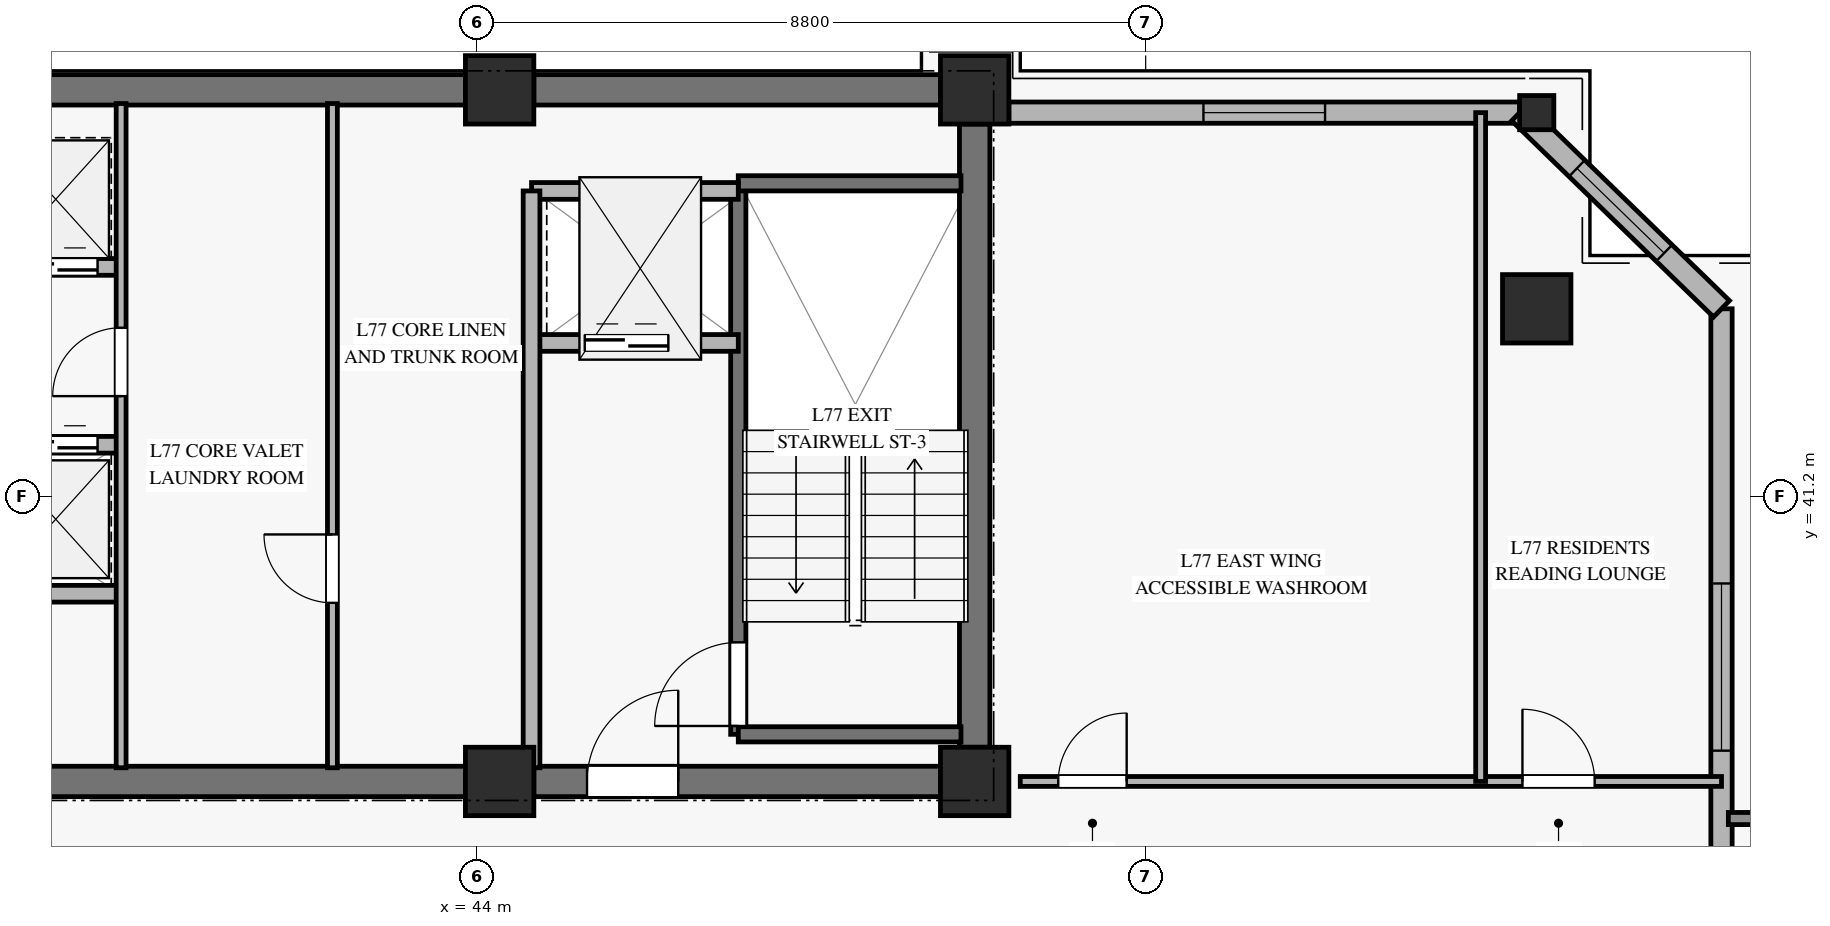
"""IFC4 building model, lengths in metres.
Left out: names, types, materials, properties, quantities, classifications, styles, units other than length and angle.
Written with IfcOpenShell. Run it as: python <this file> out.ifc"""

import sys

from ifc_helpers import new_model, si_unit, direction, frame, frame_2d, origin, origin_2d, place, context, subcontext, project, spatial, rectangle, hollow_rectangle, extrude, source, transform, mapped, element, fill, save


model = new_model("IFC4")
c1 = context("Model", 3, precision=1e-05, world=origin(), true_north=direction((0.0, 1.0)))
c2 = subcontext(c1, "Body", "Model", "MODEL_VIEW")
j1 = project(units=[si_unit("LENGTHUNIT", "METRE"), si_unit("PLANEANGLEUNIT", "RADIAN")], contexts=[c1])
p1 = place(None, origin())
s1 = spatial("IfcSite", under=j1, at=p1, CompositionType="ELEMENT")
p2 = place(p1, origin())
s2 = spatial("IfcBuilding", under=s1, at=p2, CompositionType="ELEMENT")
p3 = place(p2, frame((0.0, 0.0, 300.6)))
s3 = spatial("IfcBuildingStorey", under=s2, at=p3, CompositionType="ELEMENT", Elevation=300.6)
m1 = source(origin(), c2, "Body", "SweptSolid", [
    extrude(rectangle(XDim=0.9, YDim=0.9, at=origin_2d()), origin(), (0.0, 0.0, 1.0), 3.185),
])
for number, where, z_axis, x_axis in (
    (1, (44.3, 37.45, 0.0), (0.0, 0.0, 1.0), (1.0, 0.0, 0.0)),
    (2, (44.3, 46.55, 0.0), (0.0, 0.0, 1.0), (1.0, 0.0, 0.0)),
    (3, (50.55, 37.45, 0.0), (0.0, 0.0, 1.0), (1.0, 0.0, 0.0)),
    (4, (50.55, 46.55, 0.0), (0.0, 0.0, 1.0), (1.0, 0.0, 0.0)),
):
    element("IfcColumn", number, at=place(p3, frame(where, z_axis=z_axis, x_axis=x_axis)), inside=s3, PredefinedType="PILASTER", context=c2, shape_type="MappedRepresentation", body=[
        mapped(m1, transform((0.0, 0.0, 0.0), x_axis=(1.0, 0.0, 0.0), y_axis=(0.0, 1.0, 0.0), z_axis=(0.0, 0.0, 1.0), scale=1.0)),
    ])
p4 = place(p3, frame((36.05, 46.55, 0.0), z_axis=(0.0, 0.0, 1.0), x_axis=(1.0, 0.0, 0.0)))
e5 = element("IfcWall", 5, at=p4, inside=s3, PredefinedType="SHEAR", context=c2, shape_type="SweptSolid", body=[
    extrude(rectangle(XDim=7.8, YDim=0.4, at=frame_2d((3.9, 0.0))), origin(), (0.0, 0.0, 1.0), 3.185),
])
p5 = place(p3, frame((44.75, 46.55, 0.0), z_axis=(0.0, 0.0, 1.0), x_axis=(1.0, 0.0, 0.0)))
e6 = element("IfcWall", 6, at=p5, inside=s3, PredefinedType="SHEAR", context=c2, shape_type="SweptSolid", body=[
    extrude(rectangle(XDim=5.35, YDim=0.4, at=frame_2d((2.675, 0.0))), origin(), (0.0, 0.0, 1.0), 3.185),
])
p6 = place(p3, frame((36.05, 37.45, 0.0), z_axis=(0.0, 0.0, 1.0), x_axis=(1.0, 0.0, 0.0)))
e7 = element("IfcWall", 7, at=p6, inside=s3, PredefinedType="SHEAR", context=c2, shape_type="SweptSolid", body=[
    extrude(rectangle(XDim=7.8, YDim=0.4, at=frame_2d((3.9, 0.0))), origin(), (0.0, 0.0, 1.0), 3.185),
])
p7 = place(p3, frame((44.75, 37.45, 0.0), z_axis=(0.0, 0.0, 1.0), x_axis=(1.0, 0.0, 0.0)))
e8 = element("IfcWall", 8, at=p7, inside=s3, PredefinedType="SHEAR", context=c2, shape_type="SweptSolid", body=[
    extrude(rectangle(XDim=5.35, YDim=0.4, at=frame_2d((2.675, 0.0))), origin(), (0.0, 0.0, 1.0), 3.185),
])
p8 = place(p7, frame((0.7, 0.0, 0.0)))
e9 = element("IfcOpeningElement", 9, at=p8, cuts=e8, PredefinedType="OPENING", context=c2, shape_type="SweptSolid", body=[
    extrude(rectangle(XDim=1.2, YDim=2.15, at=frame_2d((0.6, 1.075))), frame((0.0, 0.21, 0.0), z_axis=(0.0, -1.0, 0.0), x_axis=(1.0, 0.0, 0.0)), (0.0, 0.0, 1.0), 0.42),
])
p9 = place(p3, frame((50.55, 37.9, 0.0), z_axis=(0.0, 0.0, 1.0), x_axis=(0.0, 1.0, 0.0)))
e10 = element("IfcWall", 10, at=p9, inside=s3, PredefinedType="SHEAR", context=c2, shape_type="SweptSolid", body=[
    extrude(rectangle(XDim=8.2, YDim=0.4, at=frame_2d((4.1, 0.0))), origin(), (0.0, 0.0, 1.0), 3.185),
])
m2 = source(origin(), c2, "Body", "SweptSolid", [
    extrude(hollow_rectangle(XDim=0.9, YDim=0.9, WallThickness=0.04, at=origin_2d()), origin(), (0.0, 0.0, 1.0), 3.207),
])
p10 = place(p3, frame((57.945, 43.669, 0.0), z_axis=(-0.115424259294, 0.014389963725, 0.993212046499), x_axis=(-0.123712481455, -0.992318105212, 0.0)))
e11 = element("IfcColumn", 11, at=p10, inside=s3, PredefinedType="COLUMN", context=c2, shape_type="MappedRepresentation", body=[
    mapped(m2, transform((0.0, 0.0, 0.0), x_axis=(1.0, 0.0, 0.0), y_axis=(0.0, 1.0, 0.0), z_axis=(0.0, 0.0, 1.0), scale=1.0)),
])
m3 = source(origin(), c2, "Body", "SweptSolid", [
    extrude(hollow_rectangle(XDim=0.45, YDim=0.45, WallThickness=0.022, at=origin_2d()), origin(), (0.0, 0.0, 1.0), 3.206),
])
p11 = place(p3, frame((57.945, 46.25, 0.0), z_axis=(-0.115436211662, 0.0, 0.993314895205), x_axis=(0.0, -1.0, 0.0)))
e12 = element("IfcColumn", 12, at=p11, inside=s3, PredefinedType="COLUMN", context=c2, shape_type="MappedRepresentation", body=[
    mapped(m3, transform((0.0, 0.0, 0.0), x_axis=(1.0, 0.0, 0.0), y_axis=(0.0, 1.0, 0.0), z_axis=(0.0, 0.0, 1.0), scale=1.0)),
])
p12 = place(p3, frame((60.376, 32.696, 0.0), z_axis=(0.0, 0.0, 1.0), x_axis=(0.0, 1.0, 0.0)))
e13 = element("IfcWall", 13, at=p12, inside=s3, PredefinedType="SOLIDWALL", context=c2, shape_type="SweptSolid", body=[
    extrude(rectangle(XDim=10.973, YDim=0.28, at=frame_2d((5.486, 0.0))), origin(), (0.0, 0.0, 1.0), 2.815),
])
p13 = place(p12, frame((5.159, 0.0, 0.45)))
e14 = element("IfcOpeningElement", 14, at=p13, cuts=e13, PredefinedType="OPENING", context=c2, shape_type="SweptSolid", body=[
    extrude(rectangle(XDim=2.2, YDim=2.1, at=frame_2d((1.1, 1.05))), frame((0.0, 0.15, 0.0), z_axis=(0.0, -1.0, 0.0), x_axis=(1.0, 0.0, 0.0)), (0.0, 0.0, 1.0), 0.3),
])
p14 = place(p3, frame((51.0, 46.25, 0.0), z_axis=(0.0, 0.0, 1.0), x_axis=(1.0, 0.0, 0.0)))
e15 = element("IfcWall", 15, at=p14, inside=s3, PredefinedType="SOLIDWALL", context=c2, shape_type="SweptSolid", body=[
    extrude(rectangle(XDim=6.72, YDim=0.28, at=frame_2d((3.36, 0.0))), origin(), (0.0, 0.0, 1.0), 2.815),
])
p15 = place(p14, frame((2.56, 0.0, 0.45)))
e16 = element("IfcOpeningElement", 16, at=p15, cuts=e15, PredefinedType="OPENING", context=c2, shape_type="SweptSolid", body=[
    extrude(rectangle(XDim=1.6, YDim=2.0, at=frame_2d((0.8, 1.0))), frame((0.0, 0.15, 0.0), z_axis=(0.0, -1.0, 0.0), x_axis=(1.0, 0.0, 0.0)), (0.0, 0.0, 1.0), 0.3),
])
p16 = place(p3, frame((60.376, 43.669, 0.0), z_axis=(0.0, 0.0, 1.0), x_axis=(-0.717153230711, 0.696915521194, 0.0)))
e17 = element("IfcWall", 17, at=p16, inside=s3, PredefinedType="SOLIDWALL", context=c2, shape_type="SweptSolid", body=[
    extrude(rectangle(XDim=3.704, YDim=0.3, at=frame_2d((1.852, 0.0))), origin(), (0.0, 0.0, 1.0), 2.815),
])
p17 = place(p16, frame((1.052, 0.0, 0.45)))
e18 = element("IfcOpeningElement", 18, at=p17, cuts=e17, PredefinedType="OPENING", context=c2, shape_type="SweptSolid", body=[
    extrude(rectangle(XDim=1.6, YDim=2.0, at=frame_2d((0.8, 1.0))), frame((0.0, 0.16, 0.0), z_axis=(0.0, -1.0, 0.0), x_axis=(1.0, 0.0, 0.0)), (0.0, 0.0, 1.0), 0.32),
])
p18 = place(p3, frame((47.44, 38.07, 0.0), z_axis=(0.0, 0.0, 1.0), x_axis=(0.0, 1.0, 0.0)))
e19 = element("IfcWall", 19, at=p18, inside=s3, PredefinedType="SOLIDWALL", context=c2, shape_type="SweptSolid", body=[
    extrude(rectangle(XDim=7.25, YDim=0.2, at=frame_2d((3.625, 0.0))), origin(), (0.0, 0.0, 1.0), 3.4),
])
p19 = place(p18, frame((0.11, 0.0, 0.0)))
e20 = element("IfcOpeningElement", 20, at=p19, cuts=e19, PredefinedType="OPENING", context=c2, shape_type="SweptSolid", body=[
    extrude(rectangle(XDim=1.1, YDim=2.15, at=frame_2d((0.55, 1.075))), frame((0.0, 0.11, 0.0), z_axis=(0.0, -1.0, 0.0), x_axis=(1.0, 0.0, 0.0)), (0.0, 0.0, 1.0), 0.22),
])
for number, where, z_axis, x_axis in (
    (21, (47.44, 45.32, 0.0), (0.0, 0.0, 1.0), (1.0, 0.0, 0.0)),
    (22, (47.44, 38.07, 0.0), (0.0, 0.0, 1.0), (1.0, 0.0, 0.0)),
):
    element("IfcWall", number, at=place(p3, frame(where, z_axis=z_axis, x_axis=x_axis)), inside=s3, PredefinedType="SOLIDWALL", context=c2, shape_type="SweptSolid", body=[
        extrude(rectangle(XDim=2.93, YDim=0.2, at=frame_2d((1.465, 0.0))), origin(), (0.0, 0.0, 1.0), 3.4),
    ])
p20 = place(p3, frame((44.72, 43.22, 0.0), z_axis=(0.0, 0.0, 1.0), x_axis=(1.0, 0.0, 0.0)))
e23 = element("IfcWall", 23, at=p20, inside=s3, PredefinedType="SOLIDWALL", context=c2, shape_type="SweptSolid", body=[
    extrude(rectangle(XDim=2.72, YDim=0.22, at=frame_2d((1.36, 0.0))), origin(), (0.0, 0.0, 1.0), 3.185),
])
p21 = place(p20, frame((0.7, 0.0, 0.0)))
e24 = element("IfcOpeningElement", 24, at=p21, cuts=e23, PredefinedType="OPENING", context=c2, shape_type="SweptSolid", body=[
    extrude(rectangle(XDim=1.1, YDim=2.2, at=frame_2d((0.55, 1.1))), frame((0.0, 0.12, 0.0), z_axis=(0.0, -1.0, 0.0), x_axis=(1.0, 0.0, 0.0)), (0.0, 0.0, 1.0), 0.24),
])
p22 = place(p3, frame((44.72, 45.22, 0.0), z_axis=(0.0, 0.0, 1.0), x_axis=(1.0, 0.0, 0.0)))
e25 = element("IfcWall", 25, at=p22, inside=s3, PredefinedType="SOLIDWALL", context=c2, shape_type="SweptSolid", body=[
    extrude(rectangle(XDim=2.72, YDim=0.22, at=frame_2d((1.36, 0.0))), origin(), (0.0, 0.0, 1.0), 3.185),
])
p23 = place(p3, frame((44.72, 37.63, 0.0), z_axis=(0.0, 0.0, 1.0), x_axis=(0.0, 1.0, 0.0)))
e26 = element("IfcWall", 26, at=p23, inside=s3, PredefinedType="SOLIDWALL", context=c2, shape_type="SweptSolid", body=[
    extrude(rectangle(XDim=7.59, YDim=0.22, at=frame_2d((3.795, 0.0))), origin(), (0.0, 0.0, 1.0), 3.185),
])
p24 = place(p3, frame((36.12, 44.22, 0.0), z_axis=(0.0, 0.0, 1.0), x_axis=(1.0, 0.0, 0.0)))
e27 = element("IfcWall", 27, at=p24, inside=s3, PredefinedType="SOLIDWALL", context=c2, shape_type="SweptSolid", body=[
    extrude(rectangle(XDim=3.2, YDim=0.22, at=frame_2d((1.6, 0.0))), origin(), (0.0, 0.0, 1.0), 3.185),
])
p25 = place(p24, frame((0.3, 0.0, 0.0)))
e28 = element("IfcOpeningElement", 28, at=p25, cuts=e27, PredefinedType="OPENING", context=c2, shape_type="SweptSolid", body=[
    extrude(rectangle(XDim=1.1, YDim=2.2, at=frame_2d((0.55, 1.1))), frame((0.0, 0.12, 0.0), z_axis=(0.0, -1.0, 0.0), x_axis=(1.0, 0.0, 0.0)), (0.0, 0.0, 1.0), 0.24),
])
p26 = place(p24, frame((1.79, 0.0, 0.0)))
e29 = element("IfcOpeningElement", 29, at=p26, cuts=e27, PredefinedType="OPENING", context=c2, shape_type="SweptSolid", body=[
    extrude(rectangle(XDim=1.1, YDim=2.2, at=frame_2d((0.55, 1.1))), frame((0.0, 0.12, 0.0), z_axis=(0.0, -1.0, 0.0), x_axis=(1.0, 0.0, 0.0)), (0.0, 0.0, 1.0), 0.24),
])
p27 = place(p3, frame((36.12, 41.88, 0.0), z_axis=(0.0, 0.0, 1.0), x_axis=(1.0, 0.0, 0.0)))
e30 = element("IfcWall", 30, at=p27, inside=s3, PredefinedType="SOLIDWALL", context=c2, shape_type="SweptSolid", body=[
    extrude(rectangle(XDim=3.2, YDim=0.22, at=frame_2d((1.6, 0.0))), origin(), (0.0, 0.0, 1.0), 3.185),
])
p28 = place(p27, frame((0.3, 0.0, 0.0)))
e31 = element("IfcOpeningElement", 31, at=p28, cuts=e30, PredefinedType="OPENING", context=c2, shape_type="SweptSolid", body=[
    extrude(rectangle(XDim=1.1, YDim=2.2, at=frame_2d((0.55, 1.1))), frame((0.0, 0.12, 0.0), z_axis=(0.0, -1.0, 0.0), x_axis=(1.0, 0.0, 0.0)), (0.0, 0.0, 1.0), 0.24),
])
p29 = place(p27, frame((1.79, 0.0, 0.0)))
e32 = element("IfcOpeningElement", 32, at=p29, cuts=e30, PredefinedType="OPENING", context=c2, shape_type="SweptSolid", body=[
    extrude(rectangle(XDim=1.1, YDim=2.2, at=frame_2d((0.55, 1.1))), frame((0.0, 0.12, 0.0), z_axis=(0.0, -1.0, 0.0), x_axis=(1.0, 0.0, 0.0)), (0.0, 0.0, 1.0), 0.24),
])
p30 = place(p3, frame((36.12, 39.92, 0.0), z_axis=(0.0, 0.0, 1.0), x_axis=(1.0, 0.0, 0.0)))
e33 = element("IfcWall", 33, at=p30, inside=s3, PredefinedType="SOLIDWALL", context=c2, shape_type="SweptSolid", body=[
    extrude(rectangle(XDim=3.2, YDim=0.22, at=frame_2d((1.6, 0.0))), origin(), (0.0, 0.0, 1.0), 3.185),
])
p31 = place(p3, frame((39.32, 37.63, 0.0), z_axis=(0.0, 0.0, 1.0), x_axis=(0.0, 1.0, 0.0)))
e34 = element("IfcWall", 34, at=p31, inside=s3, PredefinedType="PARTITIONING", context=c2, shape_type="SweptSolid", body=[
    extrude(rectangle(XDim=8.74, YDim=0.13, at=frame_2d((4.37, 0.0))), origin(), (0.0, 0.0, 1.0), 3.185),
])
p32 = place(p31, frame((4.89, 0.0, 0.0)))
e35 = element("IfcOpeningElement", 35, at=p32, cuts=e34, PredefinedType="OPENING", context=c2, shape_type="SweptSolid", body=[
    extrude(rectangle(XDim=0.9, YDim=2.1, at=frame_2d((0.45, 1.05))), frame((0.0, 0.075, 0.0), z_axis=(0.0, -1.0, 0.0), x_axis=(1.0, 0.0, 0.0)), (0.0, 0.0, 1.0), 0.15),
])
p33 = place(p3, frame((42.1, 37.63, 0.0), z_axis=(0.0, 0.0, 1.0), x_axis=(0.0, 1.0, 0.0)))
e36 = element("IfcWall", 36, at=p33, inside=s3, PredefinedType="PARTITIONING", context=c2, shape_type="SweptSolid", body=[
    extrude(rectangle(XDim=8.74, YDim=0.13, at=frame_2d((4.37, 0.0))), origin(), (0.0, 0.0, 1.0), 3.185),
])
p34 = place(p33, frame((2.17, 0.0, 0.0)))
e37 = element("IfcOpeningElement", 37, at=p34, cuts=e36, PredefinedType="OPENING", context=c2, shape_type="SweptSolid", body=[
    extrude(rectangle(XDim=0.9, YDim=2.1, at=frame_2d((0.45, 1.05))), frame((0.0, 0.075, 0.0), z_axis=(0.0, -1.0, 0.0), x_axis=(1.0, 0.0, 0.0)), (0.0, 0.0, 1.0), 0.15),
])
p35 = place(p3, frame((51.15, 37.45, 0.0), z_axis=(0.0, 0.0, 1.0), x_axis=(1.0, 0.0, 0.0)))
e38 = element("IfcWall", 38, at=p35, inside=s3, PredefinedType="PARTITIONING", context=c2, shape_type="SweptSolid", body=[
    extrude(rectangle(XDim=9.226, YDim=0.13, at=frame_2d((4.613, 0.0))), origin(), (0.0, 0.0, 1.0), 2.82),
])
p36 = place(p35, frame((0.5, 0.0, 0.0)))
e39 = element("IfcOpeningElement", 39, at=p36, cuts=e38, PredefinedType="OPENING", context=c2, shape_type="SweptSolid", body=[
    extrude(rectangle(XDim=0.9, YDim=2.1, at=frame_2d((0.45, 1.05))), frame((0.0, 0.075, 0.0), z_axis=(0.0, -1.0, 0.0), x_axis=(1.0, 0.0, 0.0)), (0.0, 0.0, 1.0), 0.15),
])
p37 = place(p35, frame((6.607, 0.0, 0.0)))
e40 = element("IfcOpeningElement", 40, at=p37, cuts=e38, PredefinedType="OPENING", context=c2, shape_type="SweptSolid", body=[
    extrude(rectangle(XDim=0.95, YDim=2.1, at=frame_2d((0.475, 1.05))), frame((0.0, 0.075, 0.0), z_axis=(0.0, -1.0, 0.0), x_axis=(1.0, 0.0, 0.0)), (0.0, 0.0, 1.0), 0.15),
])
p38 = place(p3, frame((57.207, 37.45, 0.0), z_axis=(0.0, 0.0, 1.0), x_axis=(0.0, 1.0, 0.0)))
e41 = element("IfcWall", 41, at=p38, inside=s3, PredefinedType="PARTITIONING", context=c2, shape_type="SweptSolid", body=[
    extrude(rectangle(XDim=8.8, YDim=0.13, at=frame_2d((4.4, 0.0))), origin(), (0.0, 0.0, 1.0), 2.82),
])
m4 = source(origin(), c2, "Body", "SweptSolid", [
    extrude(rectangle(XDim=2.2, YDim=2.1, at=frame_2d((1.1, 1.05))), frame((0.0, 0.03, 0.0), z_axis=(0.0, -1.0, 0.0), x_axis=(1.0, 0.0, 0.0)), (0.0, 0.0, 1.0), 0.06),
])
p39 = place(p13, origin())
e42 = element("IfcWindow", 42, at=p39, inside=s3, PartitioningType="SINGLE_PANEL", PredefinedType="WINDOW", context=c2, shape_type="MappedRepresentation", body=[
    mapped(m4, transform((0.0, 0.0, 0.0), x_axis=(1.0, 0.0, 0.0), y_axis=(0.0, 1.0, 0.0), z_axis=(0.0, 0.0, 1.0), scale=1.0)),
])
fill(e14, e42)
m5 = source(origin(), c2, "Body", "SweptSolid", [
    extrude(rectangle(XDim=1.6, YDim=2.0, at=frame_2d((0.8, 1.0))), frame((0.0, 0.03, 0.0), z_axis=(0.0, -1.0, 0.0), x_axis=(1.0, 0.0, 0.0)), (0.0, 0.0, 1.0), 0.06),
])
p40 = place(p15, origin())
e43 = element("IfcWindow", 43, at=p40, inside=s3, PartitioningType="SINGLE_PANEL", PredefinedType="WINDOW", context=c2, shape_type="MappedRepresentation", body=[
    mapped(m5, transform((0.0, 0.0, 0.0), x_axis=(1.0, 0.0, 0.0), y_axis=(0.0, 1.0, 0.0), z_axis=(0.0, 0.0, 1.0), scale=1.0)),
])
fill(e16, e43)
p41 = place(p17, origin())
e44 = element("IfcWindow", 44, at=p41, inside=s3, PartitioningType="SINGLE_PANEL", PredefinedType="WINDOW", context=c2, shape_type="MappedRepresentation", body=[
    mapped(m5, transform((0.0, 0.0, 0.0), x_axis=(1.0, 0.0, 0.0), y_axis=(0.0, 1.0, 0.0), z_axis=(0.0, 0.0, 1.0), scale=1.0)),
])
fill(e18, e44)
m6 = source(origin(), c2, "Body", "SweptSolid", [
    extrude(rectangle(XDim=1.1, YDim=2.15, at=frame_2d((0.55, 1.075))), frame((0.0, 0.025, 0.0), z_axis=(0.0, -1.0, 0.0), x_axis=(1.0, 0.0, 0.0)), (0.0, 0.0, 1.0), 0.05),
])
p42 = place(p19, origin())
e45 = element("IfcDoor", 45, at=p42, inside=s3, OperationType="SINGLE_SWING_LEFT", PredefinedType="DOOR", context=c2, shape_type="MappedRepresentation", body=[
    mapped(m6, transform((0.0, 0.0, 0.0), x_axis=(1.0, 0.0, 0.0), y_axis=(0.0, 1.0, 0.0), z_axis=(0.0, 0.0, 1.0), scale=1.0)),
])
fill(e20, e45)
m7 = source(origin(), c2, "Body", "SweptSolid", [
    extrude(rectangle(XDim=1.1, YDim=2.2, at=frame_2d((0.55, 1.1))), frame((0.0, 0.025, 0.0), z_axis=(0.0, -1.0, 0.0), x_axis=(1.0, 0.0, 0.0)), (0.0, 0.0, 1.0), 0.05),
])
p43 = place(p21, origin())
e46 = element("IfcDoor", 46, at=p43, inside=s3, OperationType="SLIDING_TO_LEFT", PredefinedType="DOOR", context=c2, shape_type="MappedRepresentation", body=[
    mapped(m7, transform((0.0, 0.0, 0.0), x_axis=(1.0, 0.0, 0.0), y_axis=(0.0, 1.0, 0.0), z_axis=(0.0, 0.0, 1.0), scale=1.0)),
])
fill(e24, e46)
m8 = source(origin(), c2, "Body", "SweptSolid", [
    extrude(rectangle(XDim=1.2, YDim=2.15, at=frame_2d((0.6, 1.075))), frame((0.0, 0.025, 0.0), z_axis=(0.0, -1.0, 0.0), x_axis=(1.0, 0.0, 0.0)), (0.0, 0.0, 1.0), 0.05),
])
p44 = place(p8, origin())
e47 = element("IfcDoor", 47, at=p44, inside=s3, OperationType="SINGLE_SWING_RIGHT", PredefinedType="DOOR", context=c2, shape_type="MappedRepresentation", body=[
    mapped(m8, transform((0.0, 0.0, 0.0), x_axis=(1.0, 0.0, 0.0), y_axis=(0.0, 1.0, 0.0), z_axis=(0.0, 0.0, 1.0), scale=1.0)),
])
fill(e9, e47)
p45 = place(p26, origin())
e48 = element("IfcDoor", 48, at=p45, inside=s3, OperationType="SLIDING_TO_LEFT", PredefinedType="DOOR", context=c2, shape_type="MappedRepresentation", body=[
    mapped(m7, transform((0.0, 0.0, 0.0), x_axis=(1.0, 0.0, 0.0), y_axis=(0.0, 1.0, 0.0), z_axis=(0.0, 0.0, 1.0), scale=1.0)),
])
fill(e29, e48)
p46 = place(p29, origin())
e49 = element("IfcDoor", 49, at=p46, inside=s3, OperationType="SLIDING_TO_LEFT", PredefinedType="DOOR", context=c2, shape_type="MappedRepresentation", body=[
    mapped(m7, transform((0.0, 0.0, 0.0), x_axis=(1.0, 0.0, 0.0), y_axis=(0.0, 1.0, 0.0), z_axis=(0.0, 0.0, 1.0), scale=1.0)),
])
fill(e32, e49)
m9 = source(origin(), c2, "Body", "SweptSolid", [
    extrude(rectangle(XDim=0.9, YDim=2.1, at=frame_2d((0.45, 1.05))), frame((0.0, 0.025, 0.0), z_axis=(0.0, -1.0, 0.0), x_axis=(1.0, 0.0, 0.0)), (0.0, 0.0, 1.0), 0.05),
])
p47 = place(p32, origin())
e50 = element("IfcDoor", 50, at=p47, inside=s3, OperationType="SINGLE_SWING_LEFT", PredefinedType="DOOR", context=c2, shape_type="MappedRepresentation", body=[
    mapped(m9, transform((0.0, 0.0, 0.0), x_axis=(1.0, 0.0, 0.0), y_axis=(0.0, 1.0, 0.0), z_axis=(0.0, 0.0, 1.0), scale=1.0)),
])
fill(e35, e50)
p48 = place(p34, origin())
e51 = element("IfcDoor", 51, at=p48, inside=s3, OperationType="SINGLE_SWING_RIGHT", PredefinedType="DOOR", context=c2, shape_type="MappedRepresentation", body=[
    mapped(m9, transform((0.0, 0.0, 0.0), x_axis=(1.0, 0.0, 0.0), y_axis=(0.0, 1.0, 0.0), z_axis=(0.0, 0.0, 1.0), scale=1.0)),
])
fill(e37, e51)
p49 = place(p36, origin())
e52 = element("IfcDoor", 52, at=p49, inside=s3, OperationType="SINGLE_SWING_RIGHT", PredefinedType="DOOR", context=c2, shape_type="MappedRepresentation", body=[
    mapped(m9, transform((0.0, 0.0, 0.0), x_axis=(1.0, 0.0, 0.0), y_axis=(0.0, 1.0, 0.0), z_axis=(0.0, 0.0, 1.0), scale=1.0)),
])
fill(e39, e52)
m10 = source(origin(), c2, "Body", "SweptSolid", [
    extrude(rectangle(XDim=0.95, YDim=2.1, at=frame_2d((0.475, 1.05))), frame((0.0, 0.025, 0.0), z_axis=(0.0, -1.0, 0.0), x_axis=(1.0, 0.0, 0.0)), (0.0, 0.0, 1.0), 0.05),
])
p50 = place(p37, origin())
e53 = element("IfcDoor", 53, at=p50, inside=s3, OperationType="SINGLE_SWING_LEFT", PredefinedType="DOOR", context=c2, shape_type="MappedRepresentation", body=[
    mapped(m10, transform((0.0, 0.0, 0.0), x_axis=(1.0, 0.0, 0.0), y_axis=(0.0, 1.0, 0.0), z_axis=(0.0, 0.0, 1.0), scale=1.0)),
])
fill(e40, e53)
save(model, sys.argv[1])
